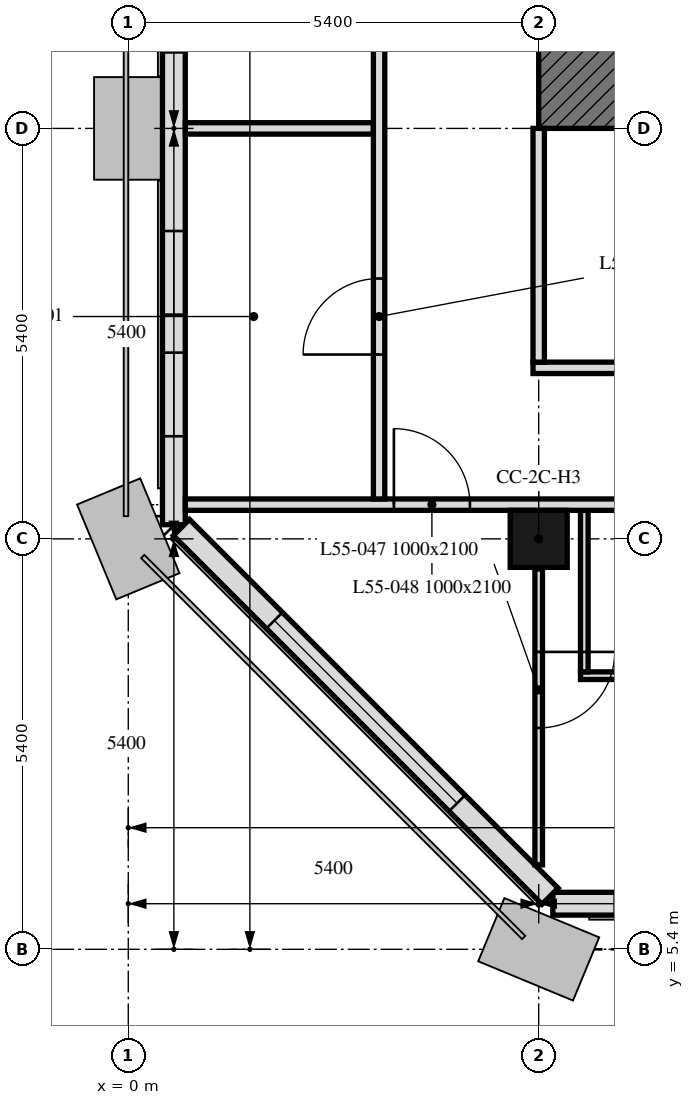
"""IFC4 building model, lengths in metres.
Left out: names, types, materials, properties, quantities, classifications, styles, units other than length and angle.
Written with IfcOpenShell. Run it as: python <this file> out.ifc"""

import sys

from ifc_helpers import new_model, si_unit, direction, frame, frame_2d, origin, origin_2d, place, context, subcontext, project, spatial, rectangle, extrude, element, fill, save


model = new_model("IFC4")
c1 = context("Model", 3, precision=1e-05, world=origin(), true_north=direction((0.0, 1.0)))
c2 = subcontext(c1, "Body", "Model", "MODEL_VIEW")
j1 = project(units=[si_unit("LENGTHUNIT", "METRE"), si_unit("PLANEANGLEUNIT", "RADIAN")], contexts=[c1])
p1 = place(None, origin())
s1 = spatial("IfcSite", under=j1, at=p1, CompositionType="ELEMENT")
p2 = place(p1, origin())
s2 = spatial("IfcBuilding", under=s1, at=p2, CompositionType="ELEMENT")
p3 = place(p2, frame((0.0, 0.0, 220.3)))
s3 = spatial("IfcBuildingStorey", under=s2, at=p3, CompositionType="ELEMENT", Elevation=220.3)
p4 = place(p3, frame((5.4, 10.8, 0.0), z_axis=(0.0, 0.0, 1.0), x_axis=(1.0, 0.0, 0.0)))
e1 = element("IfcColumn", 1, at=p4, inside=s3, PredefinedType="COLUMN", context=c2, shape_type="SweptSolid", body=[
    extrude(rectangle(XDim=0.75, YDim=0.75, at=origin_2d()), origin(), (0.0, 0.0, 1.0), 3.0),
])
p5 = place(p3, frame((5.586, 6.0, 0.0), z_axis=(0.0, 0.0, 1.0), x_axis=(1.0, 0.0, 0.0)))
e2 = element("IfcWall", 2, at=p5, inside=s3, PredefinedType="SOLIDWALL", context=c2, shape_type="SweptSolid", body=[
    extrude(rectangle(XDim=32.027, YDim=0.3, at=frame_2d((16.014, 0.0))), origin(), (0.0, 0.0, 1.0), 3.0),
])
p6 = place(p5, frame((0.814, 0.0, 0.9)))
e3 = element("IfcOpeningElement", 3, at=p6, cuts=e2, PredefinedType="OPENING", context=c2, shape_type="SweptSolid", body=[
    extrude(rectangle(XDim=3.4, YDim=1.7, at=frame_2d((1.7, 0.85))), frame((0.0, 0.16, 0.0), z_axis=(0.0, -1.0, 0.0), x_axis=(1.0, 0.0, 0.0)), (0.0, 0.0, 1.0), 0.32),
])
p7 = place(p5, frame((6.564, 0.0, 0.9)))
e4 = element("IfcOpeningElement", 4, at=p7, cuts=e2, PredefinedType="OPENING", context=c2, shape_type="SweptSolid", body=[
    extrude(rectangle(XDim=1.1, YDim=1.7, at=frame_2d((0.55, 0.85))), frame((0.0, 0.16, 0.0), z_axis=(0.0, -1.0, 0.0), x_axis=(1.0, 0.0, 0.0)), (0.0, 0.0, 1.0), 0.32),
])
p8 = place(p5, frame((11.614, 0.0, 0.9)))
e5 = element("IfcOpeningElement", 5, at=p8, cuts=e2, PredefinedType="OPENING", context=c2, shape_type="SweptSolid", body=[
    extrude(rectangle(XDim=3.4, YDim=1.7, at=frame_2d((1.7, 0.85))), frame((0.0, 0.16, 0.0), z_axis=(0.0, -1.0, 0.0), x_axis=(1.0, 0.0, 0.0)), (0.0, 0.0, 1.0), 0.32),
])
p9 = place(p5, frame((17.364, 0.0, 0.9)))
e6 = element("IfcOpeningElement", 6, at=p9, cuts=e2, PredefinedType="OPENING", context=c2, shape_type="SweptSolid", body=[
    extrude(rectangle(XDim=1.1, YDim=1.7, at=frame_2d((0.55, 0.85))), frame((0.0, 0.16, 0.0), z_axis=(0.0, -1.0, 0.0), x_axis=(1.0, 0.0, 0.0)), (0.0, 0.0, 1.0), 0.32),
])
p10 = place(p5, frame((22.414, 0.0, 0.9)))
e7 = element("IfcOpeningElement", 7, at=p10, cuts=e2, PredefinedType="OPENING", context=c2, shape_type="SweptSolid", body=[
    extrude(rectangle(XDim=3.4, YDim=1.7, at=frame_2d((1.7, 0.85))), frame((0.0, 0.16, 0.0), z_axis=(0.0, -1.0, 0.0), x_axis=(1.0, 0.0, 0.0)), (0.0, 0.0, 1.0), 0.32),
])
p11 = place(p5, frame((28.164, 0.0, 0.9)))
e8 = element("IfcOpeningElement", 8, at=p11, cuts=e2, PredefinedType="OPENING", context=c2, shape_type="SweptSolid", body=[
    extrude(rectangle(XDim=1.1, YDim=1.7, at=frame_2d((0.55, 0.85))), frame((0.0, 0.16, 0.0), z_axis=(0.0, -1.0, 0.0), x_axis=(1.0, 0.0, 0.0)), (0.0, 0.0, 1.0), 0.32),
])
p12 = place(p3, frame((0.6, 43.014, 0.0), z_axis=(0.0, 0.0, 1.0), x_axis=(0.0, -1.0, 0.0)))
e9 = element("IfcWall", 9, at=p12, inside=s3, PredefinedType="SOLIDWALL", context=c2, shape_type="SweptSolid", body=[
    extrude(rectangle(XDim=32.027, YDim=0.3, at=frame_2d((16.014, 0.0))), origin(), (0.0, 0.0, 1.0), 3.0),
])
p13 = place(p12, frame((1.789, 0.0, 0.9)))
e10 = element("IfcOpeningElement", 10, at=p13, cuts=e9, PredefinedType="OPENING", context=c2, shape_type="SweptSolid", body=[
    extrude(rectangle(XDim=0.65, YDim=1.7, at=frame_2d((0.325, 0.85))), frame((0.0, 0.16, 0.0), z_axis=(0.0, -1.0, 0.0), x_axis=(1.0, 0.0, 0.0)), (0.0, 0.0, 1.0), 0.32),
])
p14 = place(p12, frame((2.764, 0.0, 0.9)))
e11 = element("IfcOpeningElement", 11, at=p14, cuts=e9, PredefinedType="OPENING", context=c2, shape_type="SweptSolid", body=[
    extrude(rectangle(XDim=1.1, YDim=1.7, at=frame_2d((0.55, 0.85))), frame((0.0, 0.16, 0.0), z_axis=(0.0, -1.0, 0.0), x_axis=(1.0, 0.0, 0.0)), (0.0, 0.0, 1.0), 0.32),
])
p15 = place(p12, frame((6.564, 0.0, 0.9)))
e12 = element("IfcOpeningElement", 12, at=p15, cuts=e9, PredefinedType="OPENING", context=c2, shape_type="SweptSolid", body=[
    extrude(rectangle(XDim=1.1, YDim=1.7, at=frame_2d((0.55, 0.85))), frame((0.0, 0.16, 0.0), z_axis=(0.0, -1.0, 0.0), x_axis=(1.0, 0.0, 0.0)), (0.0, 0.0, 1.0), 0.32),
])
p16 = place(p12, frame((8.164, 0.0, 0.9)))
e13 = element("IfcOpeningElement", 13, at=p16, cuts=e9, PredefinedType="OPENING", context=c2, shape_type="SweptSolid", body=[
    extrude(rectangle(XDim=1.1, YDim=1.7, at=frame_2d((0.55, 0.85))), frame((0.0, 0.16, 0.0), z_axis=(0.0, -1.0, 0.0), x_axis=(1.0, 0.0, 0.0)), (0.0, 0.0, 1.0), 0.32),
])
p17 = place(p12, frame((11.614, 0.0, 0.9)))
e14 = element("IfcOpeningElement", 14, at=p17, cuts=e9, PredefinedType="OPENING", context=c2, shape_type="SweptSolid", body=[
    extrude(rectangle(XDim=3.4, YDim=1.7, at=frame_2d((1.7, 0.85))), frame((0.0, 0.16, 0.0), z_axis=(0.0, -1.0, 0.0), x_axis=(1.0, 0.0, 0.0)), (0.0, 0.0, 1.0), 0.32),
])
p18 = place(p12, frame((17.364, 0.0, 0.9)))
e15 = element("IfcOpeningElement", 15, at=p18, cuts=e9, PredefinedType="OPENING", context=c2, shape_type="SweptSolid", body=[
    extrude(rectangle(XDim=1.1, YDim=1.7, at=frame_2d((0.55, 0.85))), frame((0.0, 0.16, 0.0), z_axis=(0.0, -1.0, 0.0), x_axis=(1.0, 0.0, 0.0)), (0.0, 0.0, 1.0), 0.32),
])
p19 = place(p12, frame((18.964, 0.0, 0.9)))
e16 = element("IfcOpeningElement", 16, at=p19, cuts=e9, PredefinedType="OPENING", context=c2, shape_type="SweptSolid", body=[
    extrude(rectangle(XDim=1.1, YDim=1.7, at=frame_2d((0.55, 0.85))), frame((0.0, 0.16, 0.0), z_axis=(0.0, -1.0, 0.0), x_axis=(1.0, 0.0, 0.0)), (0.0, 0.0, 1.0), 0.32),
])
p20 = place(p12, frame((22.414, 0.0, 0.9)))
e17 = element("IfcOpeningElement", 17, at=p20, cuts=e9, PredefinedType="OPENING", context=c2, shape_type="SweptSolid", body=[
    extrude(rectangle(XDim=3.4, YDim=1.7, at=frame_2d((1.7, 0.85))), frame((0.0, 0.16, 0.0), z_axis=(0.0, -1.0, 0.0), x_axis=(1.0, 0.0, 0.0)), (0.0, 0.0, 1.0), 0.32),
])
p21 = place(p12, frame((28.164, 0.0, 0.9)))
e18 = element("IfcOpeningElement", 18, at=p21, cuts=e9, PredefinedType="OPENING", context=c2, shape_type="SweptSolid", body=[
    extrude(rectangle(XDim=1.1, YDim=1.7, at=frame_2d((0.55, 0.85))), frame((0.0, 0.16, 0.0), z_axis=(0.0, -1.0, 0.0), x_axis=(1.0, 0.0, 0.0)), (0.0, 0.0, 1.0), 0.32),
])
p22 = place(p12, frame((29.764, 0.0, 0.9)))
e19 = element("IfcOpeningElement", 19, at=p22, cuts=e9, PredefinedType="OPENING", context=c2, shape_type="SweptSolid", body=[
    extrude(rectangle(XDim=1.1, YDim=1.7, at=frame_2d((0.55, 0.85))), frame((0.0, 0.16, 0.0), z_axis=(0.0, -1.0, 0.0), x_axis=(1.0, 0.0, 0.0)), (0.0, 0.0, 1.0), 0.32),
])
p23 = place(p3, frame((0.699, 10.949, 0.0), z_axis=(0.0, 0.0, 1.0), x_axis=(0.707106781187, -0.707106781187, 0.0)))
e20 = element("IfcWall", 20, at=p23, inside=s3, PredefinedType="SOLIDWALL", context=c2, shape_type="SweptSolid", body=[
    extrude(rectangle(XDim=6.86, YDim=0.3, at=frame_2d((3.43, 0.0))), origin(), (0.0, 0.0, 1.0), 3.0),
])
p24 = place(p23, frame((1.73, 0.0, 0.9)))
e21 = element("IfcOpeningElement", 21, at=p24, cuts=e20, PredefinedType="OPENING", context=c2, shape_type="SweptSolid", body=[
    extrude(rectangle(XDim=3.4, YDim=1.7, at=frame_2d((1.7, 0.85))), frame((0.0, 0.16, 0.0), z_axis=(0.0, -1.0, 0.0), x_axis=(1.0, 0.0, 0.0)), (0.0, 0.0, 1.0), 0.32),
])
p25 = place(p3, frame((6.0, 16.2, 0.0), z_axis=(0.0, 0.0, 1.0), x_axis=(0.0, 1.0, 0.0)))
e22 = element("IfcWall", 22, at=p25, inside=s3, PredefinedType="SOLIDWALL", context=c2, shape_type="SweptSolid", body=[
    extrude(rectangle(XDim=16.2, YDim=1.2, at=frame_2d((8.1, 0.0))), origin(), (0.0, 0.0, 1.0), 3.0),
])
p26 = place(p3, frame((3.225, 16.2, 0.0), z_axis=(0.0, 0.0, 1.0), x_axis=(-1.0, 0.0, 0.0)))
e23 = element("IfcWall", 23, at=p26, inside=s3, PredefinedType="PARTITIONING", context=c2, shape_type="SweptSolid", body=[
    extrude(rectangle(XDim=2.474, YDim=0.15, at=frame_2d((1.237, 0.0))), origin(), (0.0, 0.0, 1.0), 2.4),
])
p27 = place(p3, frame((8.35, 9.0, 0.0), z_axis=(0.0, 0.0, 1.0), x_axis=(-1.0, 0.0, 0.0)))
e24 = element("IfcWall", 24, at=p27, inside=s3, PredefinedType="PARTITIONING", context=c2, shape_type="SweptSolid", body=[
    extrude(rectangle(XDim=2.4, YDim=0.1, at=frame_2d((1.2, 0.0))), origin(), (0.0, 0.0, 1.0), 3.0),
])
p28 = place(p27, frame((0.25, 0.0, 0.0)))
e25 = element("IfcOpeningElement", 25, at=p28, cuts=e24, PredefinedType="OPENING", context=c2, shape_type="SweptSolid", body=[
    extrude(rectangle(XDim=0.9, YDim=2.1, at=frame_2d((0.45, 1.05))), frame((0.0, 0.05, 0.0), z_axis=(0.0, -1.0, 0.0), x_axis=(1.0, 0.0, 0.0)), (0.0, 0.0, 1.0), 0.1),
])
p29 = place(p3, frame((6.0, 9.05, 0.0), z_axis=(0.0, 0.0, 1.0), x_axis=(0.0, 1.0, 0.0)))
e26 = element("IfcWall", 26, at=p29, inside=s3, PredefinedType="PARTITIONING", context=c2, shape_type="SweptSolid", body=[
    extrude(rectangle(XDim=2.125, YDim=0.1, at=frame_2d((1.062, 0.0))), origin(), (0.0, 0.0, 1.0), 3.0),
])
p30 = place(p3, frame((5.4, 10.405, 0.0), z_axis=(0.0, 0.0, 1.0), x_axis=(0.0, -1.0, 0.0)))
e27 = element("IfcWall", 27, at=p30, inside=s3, PredefinedType="PARTITIONING", context=c2, shape_type="SweptSolid", body=[
    extrude(rectangle(XDim=3.893, YDim=0.1, at=frame_2d((1.946, 0.0))), origin(), (0.0, 0.0, 1.0), 3.0),
])
p31 = place(p30, frame((1.093, 0.0, 0.0)))
e28 = element("IfcOpeningElement", 28, at=p31, cuts=e27, PredefinedType="OPENING", context=c2, shape_type="SweptSolid", body=[
    extrude(rectangle(XDim=1.0, YDim=2.1, at=frame_2d((0.5, 1.05))), frame((0.0, 0.05, 0.0), z_axis=(0.0, -1.0, 0.0), x_axis=(1.0, 0.0, 0.0)), (0.0, 0.0, 1.0), 0.1),
])
p32 = place(p3, frame((0.751, 11.25, 0.0), z_axis=(0.0, 0.0, 1.0), x_axis=(1.0, 0.0, 0.0)))
e29 = element("IfcWall", 29, at=p32, inside=s3, PredefinedType="PARTITIONING", context=c2, shape_type="SweptSolid", body=[
    extrude(rectangle(XDim=41.698, YDim=0.15, at=frame_2d((20.849, 0.0))), origin(), (0.0, 0.0, 1.0), 3.0),
])
p33 = place(p32, frame((39.249, 0.0, 0.0)))
e30 = element("IfcOpeningElement", 30, at=p33, cuts=e29, PredefinedType="OPENING", context=c2, shape_type="SweptSolid", body=[
    extrude(rectangle(XDim=1.0, YDim=2.1, at=frame_2d((0.5, 1.05))), frame((0.0, 0.075, 0.0), z_axis=(0.0, -1.0, 0.0), x_axis=(1.0, 0.0, 0.0)), (0.0, 0.0, 1.0), 0.15),
])
p34 = place(p32, frame((27.649, 0.0, 0.0)))
e31 = element("IfcOpeningElement", 31, at=p34, cuts=e29, PredefinedType="OPENING", context=c2, shape_type="SweptSolid", body=[
    extrude(rectangle(XDim=1.0, YDim=2.1, at=frame_2d((0.5, 1.05))), frame((0.0, 0.075, 0.0), z_axis=(0.0, -1.0, 0.0), x_axis=(1.0, 0.0, 0.0)), (0.0, 0.0, 1.0), 0.15),
])
p35 = place(p32, frame((23.049, 0.0, 0.0)))
e32 = element("IfcOpeningElement", 32, at=p35, cuts=e29, PredefinedType="OPENING", context=c2, shape_type="SweptSolid", body=[
    extrude(rectangle(XDim=1.0, YDim=2.1, at=frame_2d((0.5, 1.05))), frame((0.0, 0.075, 0.0), z_axis=(0.0, -1.0, 0.0), x_axis=(1.0, 0.0, 0.0)), (0.0, 0.0, 1.0), 0.15),
])
p36 = place(p32, frame((11.449, 0.0, 0.0)))
e33 = element("IfcOpeningElement", 33, at=p36, cuts=e29, PredefinedType="OPENING", context=c2, shape_type="SweptSolid", body=[
    extrude(rectangle(XDim=1.0, YDim=2.1, at=frame_2d((0.5, 1.05))), frame((0.0, 0.075, 0.0), z_axis=(0.0, -1.0, 0.0), x_axis=(1.0, 0.0, 0.0)), (0.0, 0.0, 1.0), 0.15),
])
p37 = place(p32, frame((2.744, 0.0, 0.0)))
e34 = element("IfcOpeningElement", 34, at=p37, cuts=e29, PredefinedType="OPENING", context=c2, shape_type="SweptSolid", body=[
    extrude(rectangle(XDim=1.0, YDim=2.1, at=frame_2d((0.5, 1.05))), frame((0.0, 0.075, 0.0), z_axis=(0.0, -1.0, 0.0), x_axis=(1.0, 0.0, 0.0)), (0.0, 0.0, 1.0), 0.15),
])
p38 = place(p3, frame((3.3, 11.325, 0.0), z_axis=(0.0, 0.0, 1.0), x_axis=(0.0, 1.0, 0.0)))
e35 = element("IfcWall", 35, at=p38, inside=s3, PredefinedType="PARTITIONING", context=c2, shape_type="SweptSolid", body=[
    extrude(rectangle(XDim=30.0, YDim=0.15, at=frame_2d((15.0, 0.0))), origin(), (0.0, 0.0, 1.0), 2.4),
])
p39 = place(p38, frame((17.875, 0.0, 0.0)))
e36 = element("IfcOpeningElement", 36, at=p39, cuts=e35, PredefinedType="OPENING", context=c2, shape_type="SweptSolid", body=[
    extrude(rectangle(XDim=1.0, YDim=2.1, at=frame_2d((0.5, 1.05))), frame((0.0, 0.075, 0.0), z_axis=(0.0, -1.0, 0.0), x_axis=(1.0, 0.0, 0.0)), (0.0, 0.0, 1.0), 0.15),
])
p40 = place(p38, frame((1.9, 0.0, 0.0)))
e37 = element("IfcOpeningElement", 37, at=p40, cuts=e35, PredefinedType="OPENING", context=c2, shape_type="SweptSolid", body=[
    extrude(rectangle(XDim=1.0, YDim=2.1, at=frame_2d((0.5, 1.05))), frame((0.0, 0.075, 0.0), z_axis=(0.0, -1.0, 0.0), x_axis=(1.0, 0.0, 0.0)), (0.0, 0.0, 1.0), 0.15),
])
p41 = place(p38, frame((23.725, 0.0, 0.0)))
e38 = element("IfcOpeningElement", 38, at=p41, cuts=e35, PredefinedType="OPENING", context=c2, shape_type="SweptSolid", body=[
    extrude(rectangle(XDim=1.0, YDim=2.1, at=frame_2d((0.5, 1.05))), frame((0.0, 0.075, 0.0), z_axis=(0.0, -1.0, 0.0), x_axis=(1.0, 0.0, 0.0)), (0.0, 0.0, 1.0), 0.15),
])
p42 = place(p38, frame((8.425, 0.0, 0.0)))
e39 = element("IfcOpeningElement", 39, at=p42, cuts=e35, PredefinedType="OPENING", context=c2, shape_type="SweptSolid", body=[
    extrude(rectangle(XDim=1.0, YDim=2.1, at=frame_2d((0.5, 1.05))), frame((0.0, 0.075, 0.0), z_axis=(0.0, -1.0, 0.0), x_axis=(1.0, 0.0, 0.0)), (0.0, 0.0, 1.0), 0.15),
])
p43 = place(p3, frame((5.325, 13.05, 0.0), z_axis=(0.0, 0.0, 1.0), x_axis=(1.0, 0.0, 0.0)))
e40 = element("IfcWall", 40, at=p43, inside=s3, PredefinedType="PARTITIONING", context=c2, shape_type="SweptSolid", body=[
    extrude(rectangle(XDim=37.124, YDim=0.15, at=frame_2d((18.562, 0.0))), origin(), (0.0, 0.0, 1.0), 3.0),
])
p44 = place(p43, frame((23.875, 0.0, 0.0)))
e41 = element("IfcOpeningElement", 41, at=p44, cuts=e40, PredefinedType="OPENING", context=c2, shape_type="SweptSolid", body=[
    extrude(rectangle(XDim=1.0, YDim=2.1, at=frame_2d((0.5, 1.05))), frame((0.0, 0.075, 0.0), z_axis=(0.0, -1.0, 0.0), x_axis=(1.0, 0.0, 0.0)), (0.0, 0.0, 1.0), 0.15),
])
p45 = place(p43, frame((13.475, 0.0, 0.0)))
e42 = element("IfcOpeningElement", 42, at=p45, cuts=e40, PredefinedType="OPENING", context=c2, shape_type="SweptSolid", body=[
    extrude(rectangle(XDim=1.0, YDim=2.1, at=frame_2d((0.5, 1.05))), frame((0.0, 0.075, 0.0), z_axis=(0.0, -1.0, 0.0), x_axis=(1.0, 0.0, 0.0)), (0.0, 0.0, 1.0), 0.15),
])
p46 = place(p43, frame((34.095, 0.0, 0.0)))
e43 = element("IfcOpeningElement", 43, at=p46, cuts=e40, PredefinedType="OPENING", context=c2, shape_type="SweptSolid", body=[
    extrude(rectangle(XDim=1.0, YDim=2.1, at=frame_2d((0.5, 1.05))), frame((0.0, 0.075, 0.0), z_axis=(0.0, -1.0, 0.0), x_axis=(1.0, 0.0, 0.0)), (0.0, 0.0, 1.0), 0.15),
])
p47 = place(p43, frame((8.337, 0.0, 0.0)))
e44 = element("IfcOpeningElement", 44, at=p47, cuts=e40, PredefinedType="OPENING", context=c2, shape_type="SweptSolid", body=[
    extrude(rectangle(XDim=1.0, YDim=2.1, at=frame_2d((0.5, 1.05))), frame((0.0, 0.075, 0.0), z_axis=(0.0, -1.0, 0.0), x_axis=(1.0, 0.0, 0.0)), (0.0, 0.0, 1.0), 0.15),
])
p48 = place(p43, frame((1.648, 0.0, 0.0)))
e45 = element("IfcOpeningElement", 45, at=p48, cuts=e40, PredefinedType="OPENING", context=c2, shape_type="SweptSolid", body=[
    extrude(rectangle(XDim=1.0, YDim=2.1, at=frame_2d((0.5, 1.05))), frame((0.0, 0.075, 0.0), z_axis=(0.0, -1.0, 0.0), x_axis=(1.0, 0.0, 0.0)), (0.0, 0.0, 1.0), 0.15),
])
p49 = place(p43, frame((28.613, 0.0, 0.0)))
e46 = element("IfcOpeningElement", 46, at=p49, cuts=e40, PredefinedType="OPENING", context=c2, shape_type="SweptSolid", body=[
    extrude(rectangle(XDim=1.0, YDim=2.1, at=frame_2d((0.5, 1.05))), frame((0.0, 0.075, 0.0), z_axis=(0.0, -1.0, 0.0), x_axis=(1.0, 0.0, 0.0)), (0.0, 0.0, 1.0), 0.15),
])
p50 = place(p43, frame((30.625, 0.0, 0.0)))
e47 = element("IfcOpeningElement", 47, at=p50, cuts=e40, PredefinedType="OPENING", context=c2, shape_type="SweptSolid", body=[
    extrude(rectangle(XDim=1.8, YDim=2.4, at=frame_2d((0.9, 1.2))), frame((0.0, 0.075, 0.0), z_axis=(0.0, -1.0, 0.0), x_axis=(1.0, 0.0, 0.0)), (0.0, 0.0, 1.0), 0.15),
])
p51 = place(p43, frame((5.525, 0.0, 0.0)))
e48 = element("IfcOpeningElement", 48, at=p51, cuts=e40, PredefinedType="OPENING", context=c2, shape_type="SweptSolid", body=[
    extrude(rectangle(XDim=1.8, YDim=2.4, at=frame_2d((0.9, 1.2))), frame((0.0, 0.075, 0.0), z_axis=(0.0, -1.0, 0.0), x_axis=(1.0, 0.0, 0.0)), (0.0, 0.0, 1.0), 0.15),
])
p52 = place(p3, frame((5.4, 13.125, 0.0), z_axis=(0.0, 0.0, 1.0), x_axis=(0.0, 1.0, 0.0)))
e49 = element("IfcWall", 49, at=p52, inside=s3, PredefinedType="PARTITIONING", context=c2, shape_type="SweptSolid", body=[
    extrude(rectangle(XDim=3.075, YDim=0.15, at=frame_2d((1.538, 0.0))), origin(), (0.0, 0.0, 1.0), 3.0),
])
p53 = place(p21, origin())
e50 = element("IfcWindow", 50, at=p53, inside=s3, PartitioningType="SINGLE_PANEL", PredefinedType="WINDOW", context=c2, shape_type="SweptSolid", body=[
    extrude(rectangle(XDim=1.1, YDim=1.7, at=frame_2d((0.55, 0.85))), frame((0.0, 0.03, 0.0), z_axis=(0.0, -1.0, 0.0), x_axis=(1.0, 0.0, 0.0)), (0.0, 0.0, 1.0), 0.06),
])
fill(e18, e50)
p54 = place(p22, origin())
e51 = element("IfcWindow", 51, at=p54, inside=s3, PartitioningType="SINGLE_PANEL", PredefinedType="WINDOW", context=c2, shape_type="SweptSolid", body=[
    extrude(rectangle(XDim=1.1, YDim=1.7, at=frame_2d((0.55, 0.85))), frame((0.0, 0.03, 0.0), z_axis=(0.0, -1.0, 0.0), x_axis=(1.0, 0.0, 0.0)), (0.0, 0.0, 1.0), 0.06),
])
fill(e19, e51)
p55 = place(p24, origin())
e52 = element("IfcWindow", 52, at=p55, inside=s3, PartitioningType="SINGLE_PANEL", PredefinedType="WINDOW", context=c2, shape_type="SweptSolid", body=[
    extrude(rectangle(XDim=3.4, YDim=1.7, at=frame_2d((1.7, 0.85))), frame((0.0, 0.03, 0.0), z_axis=(0.0, -1.0, 0.0), x_axis=(1.0, 0.0, 0.0)), (0.0, 0.0, 1.0), 0.06),
])
fill(e21, e52)
p56 = place(p40, origin())
e53 = element("IfcDoor", 53, at=p56, inside=s3, OperationType="SINGLE_SWING_LEFT", PredefinedType="DOOR", context=c2, shape_type="SweptSolid", body=[
    extrude(rectangle(XDim=1.0, YDim=2.1, at=frame_2d((0.5, 1.05))), frame((0.0, 0.025, 0.0), z_axis=(0.0, -1.0, 0.0), x_axis=(1.0, 0.0, 0.0)), (0.0, 0.0, 1.0), 0.05),
])
fill(e37, e53)
p57 = place(p31, origin())
e54 = element("IfcDoor", 54, at=p57, inside=s3, OperationType="SINGLE_SWING_LEFT", PredefinedType="DOOR", context=c2, shape_type="SweptSolid", body=[
    extrude(rectangle(XDim=1.0, YDim=2.1, at=frame_2d((0.5, 1.05))), frame((0.0, 0.025, 0.0), z_axis=(0.0, -1.0, 0.0), x_axis=(1.0, 0.0, 0.0)), (0.0, 0.0, 1.0), 0.05),
])
fill(e28, e54)
p58 = place(p37, origin())
e55 = element("IfcDoor", 55, at=p58, inside=s3, OperationType="SINGLE_SWING_RIGHT", PredefinedType="DOOR", context=c2, shape_type="SweptSolid", body=[
    extrude(rectangle(XDim=1.0, YDim=2.1, at=frame_2d((0.5, 1.05))), frame((0.0, 0.025, 0.0), z_axis=(0.0, -1.0, 0.0), x_axis=(1.0, 0.0, 0.0)), (0.0, 0.0, 1.0), 0.05),
])
fill(e34, e55)
save(model, sys.argv[1])
